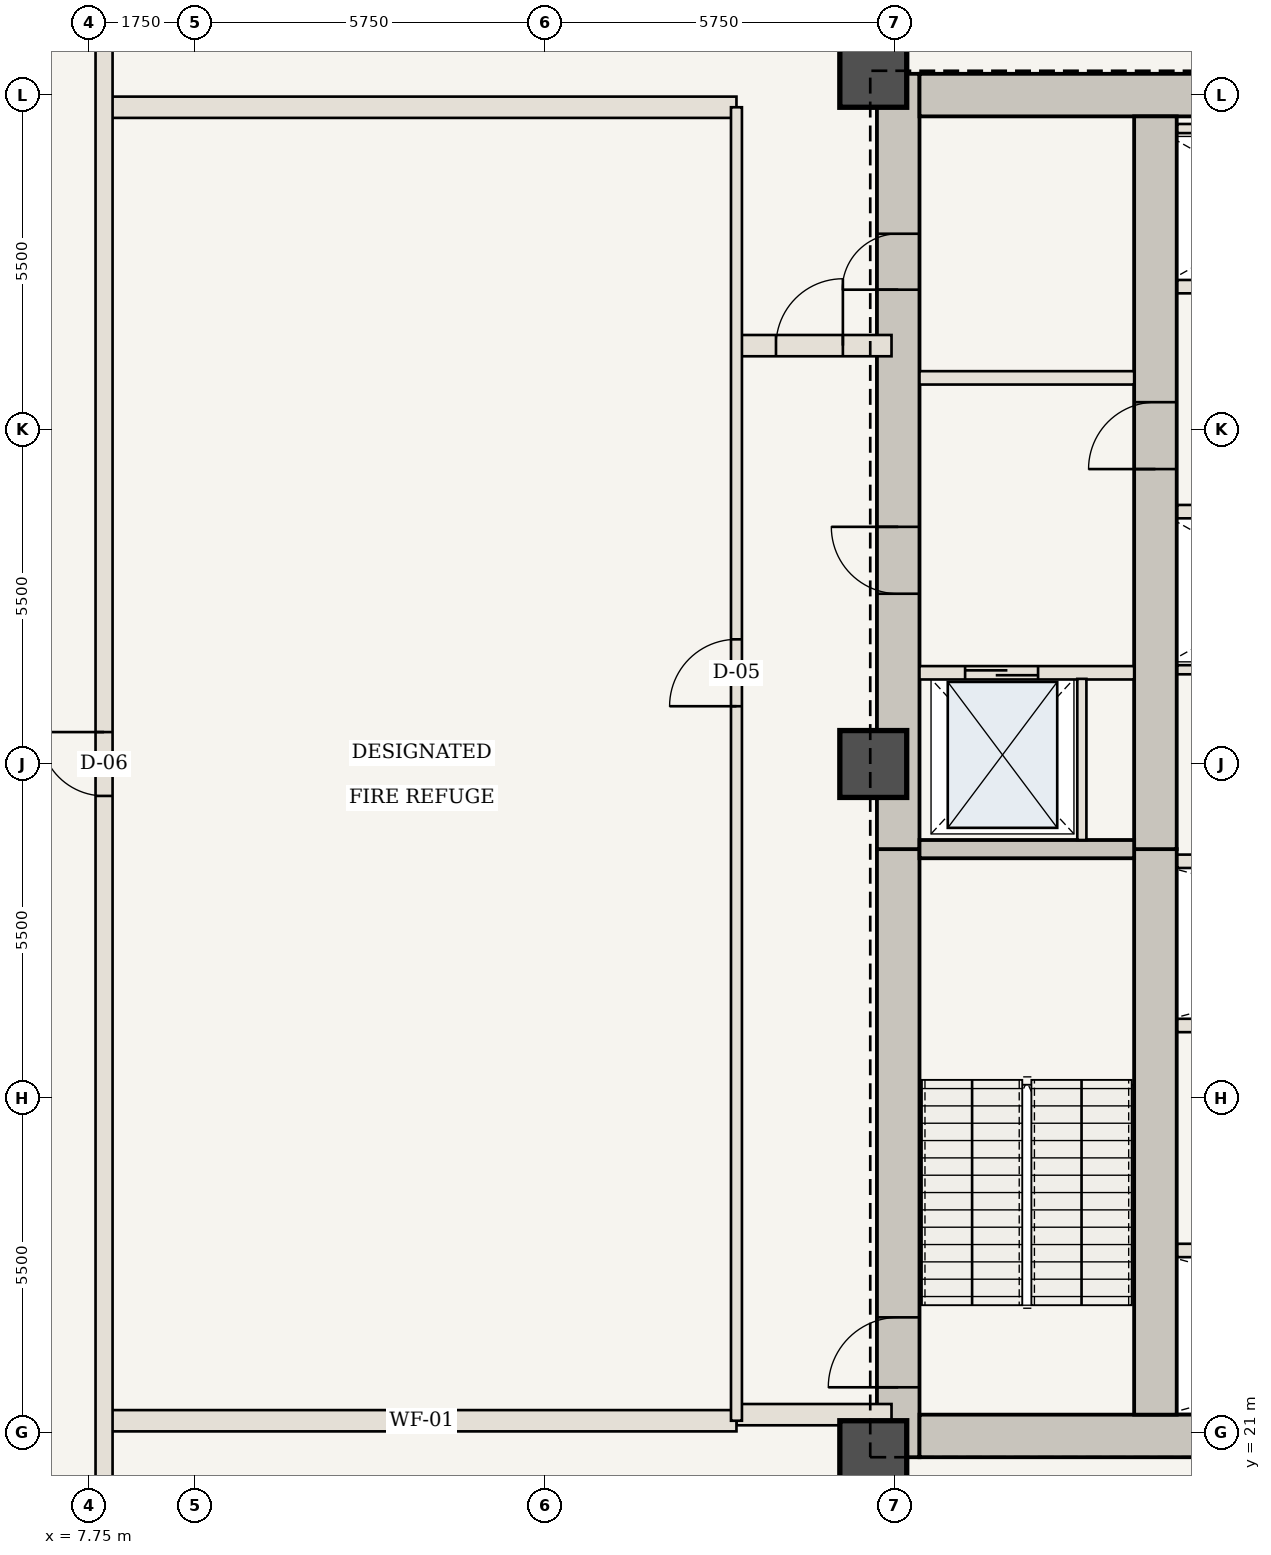
"""IFC4 building model, lengths in metres.
Left out: names, types, materials, properties, quantities, classifications, styles, units other than length and angle.
Written with IfcOpenShell. Run it as: python <this file> out.ifc"""

import sys

from ifc_helpers import new_model, si_unit, direction, frame, frame_2d, origin, origin_2d, place, context, subcontext, project, spatial, rectangle, extrude, element, fill, save


model = new_model("IFC4")
c1 = context("Model", 3, precision=1e-05, world=origin(), true_north=direction((0.0, 1.0)))
c2 = subcontext(c1, "Body", "Model", "MODEL_VIEW")
j1 = project(units=[si_unit("LENGTHUNIT", "METRE"), si_unit("PLANEANGLEUNIT", "RADIAN")], contexts=[c1])
p1 = place(None, origin())
s1 = spatial("IfcSite", under=j1, at=p1, CompositionType="ELEMENT")
p2 = place(p1, origin())
s2 = spatial("IfcBuilding", under=s1, at=p2, CompositionType="ELEMENT")
p3 = place(p2, frame((0.0, 0.0, 77.35)))
s3 = spatial("IfcBuildingStorey", under=s2, at=p3, CompositionType="ELEMENT", Elevation=77.35)
p4 = place(p3, frame((21.06, 20.6, 0.0), z_axis=(0.0, 0.0, 1.0), x_axis=(0.0, 1.0, 0.0)))
e1 = element("IfcWall", 1, at=p4, inside=s3, PredefinedType="SHEAR", context=c2, shape_type="SweptSolid", body=[
    extrude(rectangle(XDim=10.0, YDim=0.7, at=frame_2d((5.0, 0.0))), origin(), (0.0, 0.0, 1.0), 4.9),
])
p5 = place(p4, frame((1.15, 0.0, 0.0)))
e2 = element("IfcOpeningElement", 2, at=p5, cuts=e1, PredefinedType="OPENING", context=c2, shape_type="SweptSolid", body=[
    extrude(rectangle(XDim=1.15, YDim=2.15, at=frame_2d((0.575, 1.075))), frame((0.0, 0.36, 0.0), z_axis=(0.0, -1.0, 0.0), x_axis=(1.0, 0.0, 0.0)), (0.0, 0.0, 1.0), 0.72),
])
p6 = place(p3, frame((21.06, 30.6, 0.0), z_axis=(0.0, 0.0, 1.0), x_axis=(0.0, 1.0, 0.0)))
e3 = element("IfcWall", 3, at=p6, inside=s3, PredefinedType="SHEAR", context=c2, shape_type="SweptSolid", body=[
    extrude(rectangle(XDim=12.75, YDim=0.7, at=frame_2d((6.375, 0.0))), origin(), (0.0, 0.0, 1.0), 4.9),
])
p7 = place(p6, frame((4.2, 0.0, 0.0)))
e4 = element("IfcOpeningElement", 4, at=p7, cuts=e3, PredefinedType="OPENING", context=c2, shape_type="SweptSolid", body=[
    extrude(rectangle(XDim=1.1, YDim=2.15, at=frame_2d((0.55, 1.075))), frame((0.0, 0.36, 0.0), z_axis=(0.0, -1.0, 0.0), x_axis=(1.0, 0.0, 0.0)), (0.0, 0.0, 1.0), 0.72),
])
p8 = place(p6, frame((9.2, 0.0, 0.0)))
e5 = element("IfcOpeningElement", 5, at=p8, cuts=e3, PredefinedType="OPENING", context=c2, shape_type="SweptSolid", body=[
    extrude(rectangle(XDim=0.92, YDim=2.1, at=frame_2d((0.46, 1.05))), frame((0.0, 0.36, 0.0), z_axis=(0.0, -1.0, 0.0), x_axis=(1.0, 0.0, 0.0)), (0.0, 0.0, 1.0), 0.72),
])
p9 = place(p3, frame((21.41, 20.95, 0.0), z_axis=(0.0, 0.0, 1.0), x_axis=(1.0, 0.0, 0.0)))
e6 = element("IfcWall", 6, at=p9, inside=s3, PredefinedType="SHEAR", context=c2, shape_type="SweptSolid", body=[
    extrude(rectangle(XDim=13.74, YDim=0.7, at=frame_2d((6.87, 0.0))), origin(), (0.0, 0.0, 1.0), 4.9),
])
p10 = place(p3, frame((21.41, 43.0, 0.0), z_axis=(0.0, 0.0, 1.0), x_axis=(1.0, 0.0, 0.0)))
e7 = element("IfcWall", 7, at=p10, inside=s3, PredefinedType="SHEAR", context=c2, shape_type="SweptSolid", body=[
    extrude(rectangle(XDim=8.24, YDim=0.7, at=frame_2d((4.12, 0.0))), origin(), (0.0, 0.0, 1.0), 4.9),
])
p11 = place(p3, frame((25.29, 21.3, 0.0), z_axis=(0.0, 0.0, 1.0), x_axis=(0.0, 1.0, 0.0)))
e8 = element("IfcWall", 8, at=p11, inside=s3, PredefinedType="SHEAR", context=c2, shape_type="SweptSolid", body=[
    extrude(rectangle(XDim=9.3, YDim=0.7, at=frame_2d((4.65, 0.0))), origin(), (0.0, 0.0, 1.0), 4.9),
])
p12 = place(p3, frame((25.29, 30.6, 0.0), z_axis=(0.0, 0.0, 1.0), x_axis=(0.0, 1.0, 0.0)))
e9 = element("IfcWall", 9, at=p12, inside=s3, PredefinedType="SHEAR", context=c2, shape_type="SweptSolid", body=[
    extrude(rectangle(XDim=12.05, YDim=0.7, at=frame_2d((6.025, 0.0))), origin(), (0.0, 0.0, 1.0), 4.9),
])
p13 = place(p12, frame((6.25, 0.0, 0.0)))
e10 = element("IfcOpeningElement", 10, at=p13, cuts=e9, PredefinedType="OPENING", context=c2, shape_type="SweptSolid", body=[
    extrude(rectangle(XDim=1.1, YDim=2.15, at=frame_2d((0.55, 1.075))), frame((0.0, 0.36, 0.0), z_axis=(0.0, -1.0, 0.0), x_axis=(1.0, 0.0, 0.0)), (0.0, 0.0, 1.0), 0.72),
])
for number, where, z_axis, x_axis in (
    (11, (20.65, 20.65, 0.0), (0.0, 0.0, 1.0), (1.0, 0.0, 0.0)),
    (12, (20.65, 43.35, 0.0), (0.0, 0.0, 1.0), (1.0, 0.0, 0.0)),
    (13, (20.65, 32.0, 0.0), (0.0, 0.0, 1.0), (1.0, 0.0, 0.0)),
):
    element("IfcColumn", number, at=place(p3, frame(where, z_axis=z_axis, x_axis=x_axis)), inside=s3, PredefinedType="COLUMN", context=c2, shape_type="SweptSolid", body=[
        extrude(rectangle(XDim=1.1, YDim=1.1, at=origin_2d()), origin(), (0.0, 0.0, 1.0), 4.9),
    ])
p14 = place(p3, frame((21.41, 30.6, 0.0), z_axis=(0.0, 0.0, 1.0), x_axis=(1.0, 0.0, 0.0)))
e14 = element("IfcWall", 14, at=p14, inside=s3, PredefinedType="SHEAR", context=c2, shape_type="SweptSolid", body=[
    extrude(rectangle(XDim=3.53, YDim=0.3, at=frame_2d((1.765, 0.0))), origin(), (0.0, 0.0, 1.0), 4.72),
])
p15 = place(p3, frame((21.41, 33.5, 0.0), z_axis=(0.0, 0.0, 1.0), x_axis=(1.0, 0.0, 0.0)))
e15 = element("IfcWall", 15, at=p15, inside=s3, PredefinedType="STANDARD", context=c2, shape_type="SweptSolid", body=[
    extrude(rectangle(XDim=3.53, YDim=0.22, at=frame_2d((1.765, 0.0))), origin(), (0.0, 0.0, 1.0), 4.72),
])
p16 = place(p15, frame((0.75, 0.0, 0.0)))
e16 = element("IfcOpeningElement", 16, at=p16, cuts=e15, PredefinedType="OPENING", context=c2, shape_type="SweptSolid", body=[
    extrude(rectangle(XDim=1.2, YDim=2.2, at=frame_2d((0.6, 1.1))), frame((0.0, 0.12, 0.0), z_axis=(0.0, -1.0, 0.0), x_axis=(1.0, 0.0, 0.0)), (0.0, 0.0, 1.0), 0.24),
])
p17 = place(p3, frame((24.08, 30.75, 0.0), z_axis=(0.0, 0.0, 1.0), x_axis=(0.0, 1.0, 0.0)))
e17 = element("IfcWall", 17, at=p17, inside=s3, PredefinedType="STANDARD", context=c2, shape_type="SweptSolid", body=[
    extrude(rectangle(XDim=2.65, YDim=0.15, at=frame_2d((1.325, 0.0))), origin(), (0.0, 0.0, 1.0), 4.72),
])
p18 = place(p3, frame((21.41, 38.35, 0.0), z_axis=(0.0, 0.0, 1.0), x_axis=(1.0, 0.0, 0.0)))
e18 = element("IfcWall", 18, at=p18, inside=s3, PredefinedType="STANDARD", context=c2, shape_type="SweptSolid", body=[
    extrude(rectangle(XDim=3.53, YDim=0.22, at=frame_2d((1.765, 0.0))), origin(), (0.0, 0.0, 1.0), 4.72),
])
for number, where, z_axis, x_axis in (
    (19, (25.65, 24.0, 0.0), (0.0, 0.0, 1.0), (1.0, 0.0, 0.0)),
    (20, (25.65, 27.7, 0.0), (0.0, 0.0, 1.0), (1.0, 0.0, 0.0)),
    (21, (25.65, 30.4, 0.0), (0.0, 0.0, 1.0), (1.0, 0.0, 0.0)),
):
    element("IfcWall", number, at=place(p3, frame(where, z_axis=z_axis, x_axis=x_axis)), inside=s3, PredefinedType="STANDARD", context=c2, shape_type="SweptSolid", body=[
        extrude(rectangle(XDim=9.25, YDim=0.22, at=frame_2d((4.625, 0.0))), origin(), (0.0, 0.0, 1.0), 4.72),
    ])
p19 = place(p3, frame((25.65, 36.15, 0.0), z_axis=(0.0, 0.0, 1.0), x_axis=(1.0, 0.0, 0.0)))
e22 = element("IfcWall", 22, at=p19, inside=s3, PredefinedType="STANDARD", context=c2, shape_type="SweptSolid", body=[
    extrude(rectangle(XDim=4.3, YDim=0.22, at=frame_2d((2.15, 0.0))), origin(), (0.0, 0.0, 1.0), 4.72),
])
p20 = place(p3, frame((25.65, 33.55, 0.0), z_axis=(0.0, 0.0, 1.0), x_axis=(1.0, 0.0, 0.0)))
e23 = element("IfcWall", 23, at=p20, inside=s3, PredefinedType="STANDARD", context=c2, shape_type="SweptSolid", body=[
    extrude(rectangle(XDim=4.2, YDim=0.15, at=frame_2d((2.1, 0.0))), origin(), (0.0, 0.0, 1.0), 4.72),
])
p21 = place(p3, frame((25.65, 39.85, 0.0), z_axis=(0.0, 0.0, 1.0), x_axis=(1.0, 0.0, 0.0)))
e24 = element("IfcWall", 24, at=p21, inside=s3, PredefinedType="STANDARD", context=c2, shape_type="SweptSolid", body=[
    extrude(rectangle(XDim=4.3, YDim=0.22, at=frame_2d((2.15, 0.0))), origin(), (0.0, 0.0, 1.0), 4.72),
])
p22 = place(p3, frame((25.65, 42.45, 0.0), z_axis=(0.0, 0.0, 1.0), x_axis=(1.0, 0.0, 0.0)))
e25 = element("IfcWall", 25, at=p22, inside=s3, PredefinedType="STANDARD", context=c2, shape_type="SweptSolid", body=[
    extrude(rectangle(XDim=4.2, YDim=0.15, at=frame_2d((2.1, 0.0))), origin(), (0.0, 0.0, 1.0), 4.72),
])
p23 = place(p3, frame((18.4, 21.3, 0.0), z_axis=(0.0, 0.0, 1.0), x_axis=(1.0, 0.0, 0.0)))
e26 = element("IfcWall", 26, at=p23, inside=s3, PredefinedType="STANDARD", context=c2, shape_type="SweptSolid", body=[
    extrude(rectangle(XDim=2.55, YDim=0.35, at=frame_2d((1.275, 0.0))), origin(), (0.0, 0.0, 1.0), 4.72),
])
p24 = place(p3, frame((18.4, 38.88, 0.0), z_axis=(0.0, 0.0, 1.0), x_axis=(1.0, 0.0, 0.0)))
e27 = element("IfcWall", 27, at=p24, inside=s3, PredefinedType="STANDARD", context=c2, shape_type="SweptSolid", body=[
    extrude(rectangle(XDim=2.55, YDim=0.35, at=frame_2d((1.275, 0.0))), origin(), (0.0, 0.0, 1.0), 4.72),
])
p25 = place(p24, frame((0.65, 0.0, 0.0)))
e28 = element("IfcOpeningElement", 28, at=p25, cuts=e27, PredefinedType="OPENING", context=c2, shape_type="SweptSolid", body=[
    extrude(rectangle(XDim=1.1, YDim=2.15, at=frame_2d((0.55, 1.075))), frame((0.0, 0.185, 0.0), z_axis=(0.0, -1.0, 0.0), x_axis=(1.0, 0.0, 0.0)), (0.0, 0.0, 1.0), 0.37),
])
for number, where, z_axis, x_axis in (
    (29, (8.05, 21.2, 0.0), (0.0, 0.0, 1.0), (1.0, 0.0, 0.0)),
    (30, (8.05, 42.8, 0.0), (0.0, 0.0, 1.0), (1.0, 0.0, 0.0)),
):
    element("IfcWall", number, at=place(p3, frame(where, z_axis=z_axis, x_axis=x_axis)), inside=s3, PredefinedType="STANDARD", context=c2, shape_type="SweptSolid", body=[
        extrude(rectangle(XDim=10.35, YDim=0.35, at=frame_2d((5.175, 0.0))), origin(), (0.0, 0.0, 1.0), 4.72),
    ])
p26 = place(p3, frame((18.4, 21.2, 0.0), z_axis=(0.0, 0.0, 1.0), x_axis=(0.0, 1.0, 0.0)))
e31 = element("IfcWall", 31, at=p26, inside=s3, PredefinedType="STANDARD", context=c2, shape_type="SweptSolid", body=[
    extrude(rectangle(XDim=21.6, YDim=0.18, at=frame_2d((10.8, 0.0))), origin(), (0.0, 0.0, 1.0), 4.72),
])
p27 = place(p26, frame((11.75, 0.0, 0.0)))
e32 = element("IfcOpeningElement", 32, at=p27, cuts=e31, PredefinedType="OPENING", context=c2, shape_type="SweptSolid", body=[
    extrude(rectangle(XDim=1.1, YDim=2.15, at=frame_2d((0.55, 1.075))), frame((0.0, 0.1, 0.0), z_axis=(0.0, -1.0, 0.0), x_axis=(1.0, 0.0, 0.0)), (0.0, 0.0, 1.0), 0.2),
])
p28 = place(p3, frame((8.0, 8.0, 0.0), z_axis=(0.0, 0.0, 1.0), x_axis=(0.0, 1.0, 0.0)))
e33 = element("IfcWall", 33, at=p28, inside=s3, PredefinedType="USERDEFINED", context=c2, shape_type="SweptSolid", body=[
    extrude(rectangle(XDim=48.0, YDim=0.28, at=frame_2d((24.0, 0.0))), origin(), (0.0, 0.0, 1.0), 3.92),
])
p29 = place(p28, frame((23.475, 0.0, 0.0)))
e34 = element("IfcOpeningElement", 34, at=p29, cuts=e33, PredefinedType="OPENING", context=c2, shape_type="SweptSolid", body=[
    extrude(rectangle(XDim=1.05, YDim=2.2, at=frame_2d((0.525, 1.1))), frame((0.0, 0.15, 0.0), z_axis=(0.0, -1.0, 0.0), x_axis=(1.0, 0.0, 0.0)), (0.0, 0.0, 1.0), 0.3),
])
p30 = place(p5, origin())
e35 = element("IfcDoor", 35, at=p30, inside=s3, OperationType="SINGLE_SWING_LEFT", PredefinedType="DOOR", context=c2, shape_type="SweptSolid", body=[
    extrude(rectangle(XDim=1.15, YDim=2.15, at=frame_2d((0.575, 1.075))), frame((0.0, 0.025, 0.0), z_axis=(0.0, -1.0, 0.0), x_axis=(1.0, 0.0, 0.0)), (0.0, 0.0, 1.0), 0.05),
])
fill(e2, e35)
p31 = place(p7, origin())
e36 = element("IfcDoor", 36, at=p31, inside=s3, OperationType="SINGLE_SWING_RIGHT", PredefinedType="DOOR", context=c2, shape_type="SweptSolid", body=[
    extrude(rectangle(XDim=1.1, YDim=2.15, at=frame_2d((0.55, 1.075))), frame((0.0, 0.025, 0.0), z_axis=(0.0, -1.0, 0.0), x_axis=(1.0, 0.0, 0.0)), (0.0, 0.0, 1.0), 0.05),
])
fill(e4, e36)
p32 = place(p13, origin())
e37 = element("IfcDoor", 37, at=p32, inside=s3, OperationType="SINGLE_SWING_LEFT", PredefinedType="DOOR", context=c2, shape_type="SweptSolid", body=[
    extrude(rectangle(XDim=1.1, YDim=2.15, at=frame_2d((0.55, 1.075))), frame((0.0, 0.025, 0.0), z_axis=(0.0, -1.0, 0.0), x_axis=(1.0, 0.0, 0.0)), (0.0, 0.0, 1.0), 0.05),
])
fill(e10, e37)
p33 = place(p8, origin())
e38 = element("IfcDoor", 38, at=p33, inside=s3, OperationType="SINGLE_SWING_LEFT", PredefinedType="DOOR", context=c2, shape_type="SweptSolid", body=[
    extrude(rectangle(XDim=0.92, YDim=2.1, at=frame_2d((0.46, 1.05))), frame((0.0, 0.025, 0.0), z_axis=(0.0, -1.0, 0.0), x_axis=(1.0, 0.0, 0.0)), (0.0, 0.0, 1.0), 0.05),
])
fill(e5, e38)
p34 = place(p16, origin())
e39 = element("IfcDoor", 39, at=p34, inside=s3, OperationType="DOUBLE_DOOR_SLIDING", PredefinedType="DOOR", context=c2, shape_type="SweptSolid", body=[
    extrude(rectangle(XDim=1.2, YDim=2.2, at=frame_2d((0.6, 1.1))), frame((0.0, 0.025, 0.0), z_axis=(0.0, -1.0, 0.0), x_axis=(1.0, 0.0, 0.0)), (0.0, 0.0, 1.0), 0.05),
])
fill(e16, e39)
p35 = place(p25, origin())
e40 = element("IfcDoor", 40, at=p35, inside=s3, OperationType="SINGLE_SWING_RIGHT", PredefinedType="DOOR", context=c2, shape_type="SweptSolid", body=[
    extrude(rectangle(XDim=1.1, YDim=2.15, at=frame_2d((0.55, 1.075))), frame((0.0, 0.025, 0.0), z_axis=(0.0, -1.0, 0.0), x_axis=(1.0, 0.0, 0.0)), (0.0, 0.0, 1.0), 0.05),
])
fill(e28, e40)
p36 = place(p27, origin())
e41 = element("IfcDoor", 41, at=p36, inside=s3, OperationType="SINGLE_SWING_LEFT", PredefinedType="DOOR", context=c2, shape_type="SweptSolid", body=[
    extrude(rectangle(XDim=1.1, YDim=2.15, at=frame_2d((0.55, 1.075))), frame((0.0, 0.025, 0.0), z_axis=(0.0, -1.0, 0.0), x_axis=(1.0, 0.0, 0.0)), (0.0, 0.0, 1.0), 0.05),
])
fill(e32, e41)
p37 = place(p29, origin())
e42 = element("IfcDoor", 42, at=p37, inside=s3, OperationType="SINGLE_SWING_RIGHT", PredefinedType="DOOR", context=c2, shape_type="SweptSolid", body=[
    extrude(rectangle(XDim=1.05, YDim=2.2, at=frame_2d((0.525, 1.1))), frame((0.0, 0.025, 0.0), z_axis=(0.0, -1.0, 0.0), x_axis=(1.0, 0.0, 0.0)), (0.0, 0.0, 1.0), 0.05),
])
fill(e34, e42)
save(model, sys.argv[1])
